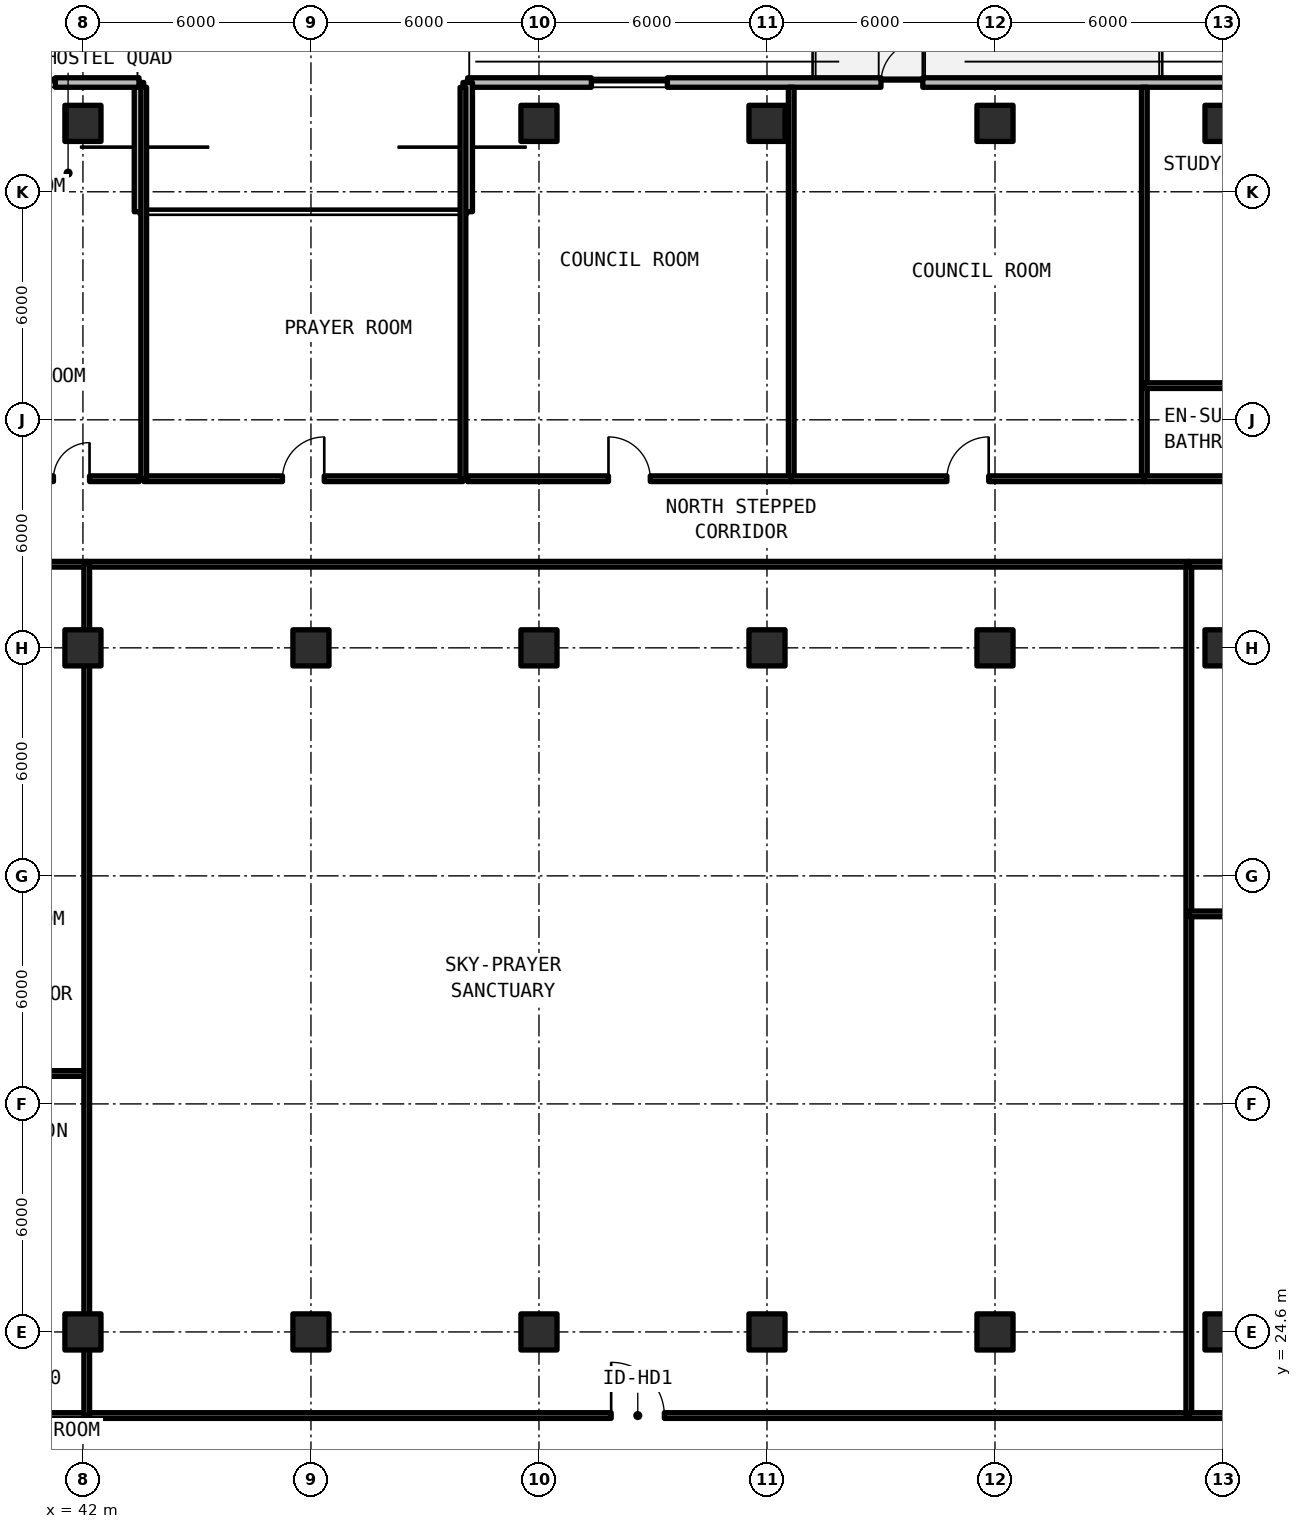
"""IFC4 building model, lengths in metres.
Left out: names, types, materials, properties, quantities, classifications, styles, units other than length and angle.
Written with IfcOpenShell. Run it as: python <this file> out.ifc"""

import sys

from ifc_helpers import new_model, si_unit, direction, frame, frame_2d, origin, origin_2d, place, context, subcontext, project, spatial, rectangle, extrude, element, fill, save


model = new_model("IFC4")
c1 = context("Model", 3, precision=1e-05, world=origin(), true_north=direction((0.0, 1.0)))
c2 = subcontext(c1, "Body", "Model", "MODEL_VIEW")
j1 = project(units=[si_unit("LENGTHUNIT", "METRE"), si_unit("PLANEANGLEUNIT", "RADIAN")], contexts=[c1])
p1 = place(None, origin())
s1 = spatial("IfcSite", under=j1, at=p1, CompositionType="ELEMENT")
p2 = place(p1, origin())
s2 = spatial("IfcBuilding", under=s1, at=p2, CompositionType="ELEMENT")
p3 = place(p2, frame((0.0, 0.0, 115.83)))
s3 = spatial("IfcBuildingStorey", under=s2, at=p3, CompositionType="ELEMENT", Elevation=115.83)
for number, where, z_axis, x_axis in (
    (1, (42.0, 24.6, 0.0), (0.0, 0.0, 1.0), (1.0, 0.0, 0.0)),
    (2, (42.0, 42.6, 0.0), (0.0, 0.0, 1.0), (1.0, 0.0, 0.0)),
    (3, (48.0, 24.6, 0.0), (0.0, 0.0, 1.0), (1.0, 0.0, 0.0)),
    (4, (48.0, 42.6, 0.0), (0.0, 0.0, 1.0), (1.0, 0.0, 0.0)),
    (5, (54.0, 24.6, 0.0), (0.0, 0.0, 1.0), (1.0, 0.0, 0.0)),
    (6, (54.0, 42.6, 0.0), (0.0, 0.0, 1.0), (1.0, 0.0, 0.0)),
    (7, (60.0, 24.6, 0.0), (0.0, 0.0, 1.0), (1.0, 0.0, 0.0)),
    (8, (60.0, 42.6, 0.0), (0.0, 0.0, 1.0), (1.0, 0.0, 0.0)),
    (9, (66.0, 24.6, 0.0), (0.0, 0.0, 1.0), (1.0, 0.0, 0.0)),
    (10, (66.0, 42.6, 0.0), (0.0, 0.0, 1.0), (1.0, 0.0, 0.0)),
    (11, (72.0, 24.6, 0.0), (0.0, 0.0, 1.0), (1.0, 0.0, 0.0)),
    (12, (72.0, 42.6, 0.0), (0.0, 0.0, 1.0), (1.0, 0.0, 0.0)),
    (13, (42.0, 56.4, 0.0), (0.0, 0.0, 1.0), (1.0, 0.0, 0.0)),
    (14, (54.0, 56.4, 0.0), (0.0, 0.0, 1.0), (1.0, 0.0, 0.0)),
    (15, (60.0, 56.4, 0.0), (0.0, 0.0, 1.0), (1.0, 0.0, 0.0)),
    (16, (66.0, 56.4, 0.0), (0.0, 0.0, 1.0), (1.0, 0.0, 0.0)),
    (17, (72.0, 56.4, 0.0), (0.0, 0.0, 1.0), (1.0, 0.0, 0.0)),
):
    element("IfcColumn", number, at=place(p3, frame(where, z_axis=z_axis, x_axis=x_axis)), inside=s3, PredefinedType="COLUMN", context=c2, shape_type="SweptSolid", body=[
        extrude(rectangle(XDim=0.95, YDim=0.95, at=origin_2d()), origin(), (0.0, 0.0, 1.0), 3.63),
    ])
p4 = place(p3, frame((96.148, 57.475, 0.0), z_axis=(0.0, 0.0, 1.0), x_axis=(-1.0, 0.0, 0.0)))
e18 = element("IfcWall", 18, at=p4, inside=s3, PredefinedType="SOLIDWALL", context=c2, shape_type="SweptSolid", body=[
    extrude(rectangle(XDim=44.023, YDim=0.25, at=frame_2d((22.012, 0.0))), origin(), (0.0, 0.0, 1.0), 3.41),
])
p5 = place(p4, frame((32.048, 0.0, 0.0)))
e19 = element("IfcOpeningElement", 19, at=p5, cuts=e18, PredefinedType="OPENING", context=c2, shape_type="SweptSolid", body=[
    extrude(rectangle(XDim=1.1, YDim=2.15, at=frame_2d((0.55, 1.075))), frame((0.0, 0.135, 0.0), z_axis=(0.0, -1.0, 0.0), x_axis=(1.0, 0.0, 0.0)), (0.0, 0.0, 1.0), 0.27),
])
p6 = place(p4, frame((19.948, 0.0, 0.0)))
e20 = element("IfcOpeningElement", 20, at=p6, cuts=e18, PredefinedType="OPENING", context=c2, shape_type="SweptSolid", body=[
    extrude(rectangle(XDim=1.1, YDim=2.15, at=frame_2d((0.55, 1.075))), frame((0.0, 0.135, 0.0), z_axis=(0.0, -1.0, 0.0), x_axis=(1.0, 0.0, 0.0)), (0.0, 0.0, 1.0), 0.27),
])
p7 = place(p4, frame((7.848, 0.0, 0.0)))
e21 = element("IfcOpeningElement", 21, at=p7, cuts=e18, PredefinedType="OPENING", context=c2, shape_type="SweptSolid", body=[
    extrude(rectangle(XDim=1.1, YDim=2.15, at=frame_2d((0.55, 1.075))), frame((0.0, 0.135, 0.0), z_axis=(0.0, -1.0, 0.0), x_axis=(1.0, 0.0, 0.0)), (0.0, 0.0, 1.0), 0.27),
])
p8 = place(p4, frame((38.769, 0.0, 0.78)))
e22 = element("IfcOpeningElement", 22, at=p8, cuts=e18, PredefinedType="OPENING", context=c2, shape_type="SweptSolid", body=[
    extrude(rectangle(XDim=2.0, YDim=1.66, at=frame_2d((1.0, 0.83))), frame((0.0, 0.135, 0.0), z_axis=(0.0, -1.0, 0.0), x_axis=(1.0, 0.0, 0.0)), (0.0, 0.0, 1.0), 0.27),
])
p9 = place(p4, frame((22.668, 0.0, 0.78)))
e23 = element("IfcOpeningElement", 23, at=p9, cuts=e18, PredefinedType="OPENING", context=c2, shape_type="SweptSolid", body=[
    extrude(rectangle(XDim=0.85, YDim=1.65, at=frame_2d((0.425, 0.825))), frame((0.0, 0.135, 0.0), z_axis=(0.0, -1.0, 0.0), x_axis=(1.0, 0.0, 0.0)), (0.0, 0.0, 1.0), 0.27),
])
p10 = place(p4, frame((14.119, 0.0, 0.78)))
e24 = element("IfcOpeningElement", 24, at=p10, cuts=e18, PredefinedType="OPENING", context=c2, shape_type="SweptSolid", body=[
    extrude(rectangle(XDim=2.0, YDim=1.66, at=frame_2d((1.0, 0.83))), frame((0.0, 0.135, 0.0), z_axis=(0.0, -1.0, 0.0), x_axis=(1.0, 0.0, 0.0)), (0.0, 0.0, 1.0), 0.27),
])
p11 = place(p4, frame((1.884, 0.0, 0.78)))
e25 = element("IfcOpeningElement", 25, at=p11, cuts=e18, PredefinedType="OPENING", context=c2, shape_type="SweptSolid", body=[
    extrude(rectangle(XDim=2.0, YDim=1.66, at=frame_2d((1.0, 0.83))), frame((0.0, 0.135, 0.0), z_axis=(0.0, -1.0, 0.0), x_axis=(1.0, 0.0, 0.0)), (0.0, 0.0, 1.0), 0.27),
])
for number, where, z_axis, x_axis in (
    (26, (52.125, 57.475, 0.0), (0.0, 0.0, 1.0), (0.0, -1.0, 0.0)),
    (27, (43.475, 54.075, 0.0), (0.0, 0.0, 1.0), (0.0, 1.0, 0.0)),
):
    element("IfcWall", number, at=place(p3, frame(where, z_axis=z_axis, x_axis=x_axis)), inside=s3, PredefinedType="SOLIDWALL", context=c2, shape_type="SweptSolid", body=[
        extrude(rectangle(XDim=3.4, YDim=0.25, at=frame_2d((1.7, 0.0))), origin(), (0.0, 0.0, 1.0), 3.41),
    ])
p12 = place(p3, frame((43.475, 57.475, 0.0), z_axis=(0.0, 0.0, 1.0), x_axis=(-1.0, 0.0, 0.0)))
e28 = element("IfcWall", 28, at=p12, inside=s3, PredefinedType="SOLIDWALL", context=c2, shape_type="SweptSolid", body=[
    extrude(rectangle(XDim=22.023, YDim=0.25, at=frame_2d((11.012, 0.0))), origin(), (0.0, 0.0, 1.0), 3.41),
])
p13 = place(p12, frame((9.175, 0.0, 0.0)))
e29 = element("IfcOpeningElement", 29, at=p13, cuts=e28, PredefinedType="OPENING", context=c2, shape_type="SweptSolid", body=[
    extrude(rectangle(XDim=1.1, YDim=2.15, at=frame_2d((0.55, 1.075))), frame((0.0, 0.135, 0.0), z_axis=(0.0, -1.0, 0.0), x_axis=(1.0, 0.0, 0.0)), (0.0, 0.0, 1.0), 0.27),
])
p14 = place(p12, frame((16.635, 0.0, 0.78)))
e30 = element("IfcOpeningElement", 30, at=p14, cuts=e28, PredefinedType="OPENING", context=c2, shape_type="SweptSolid", body=[
    extrude(rectangle(XDim=2.0, YDim=1.66, at=frame_2d((1.0, 0.83))), frame((0.0, 0.135, 0.0), z_axis=(0.0, -1.0, 0.0), x_axis=(1.0, 0.0, 0.0)), (0.0, 0.0, 1.0), 0.27),
])
p15 = place(p12, frame((14.173, 0.0, 0.78)))
e31 = element("IfcOpeningElement", 31, at=p15, cuts=e28, PredefinedType="OPENING", context=c2, shape_type="SweptSolid", body=[
    extrude(rectangle(XDim=0.85, YDim=1.65, at=frame_2d((0.425, 0.825))), frame((0.0, 0.135, 0.0), z_axis=(0.0, -1.0, 0.0), x_axis=(1.0, 0.0, 0.0)), (0.0, 0.0, 1.0), 0.27),
])
p16 = place(p12, frame((11.592, 0.0, 0.78)))
e32 = element("IfcOpeningElement", 32, at=p16, cuts=e28, PredefinedType="OPENING", context=c2, shape_type="SweptSolid", body=[
    extrude(rectangle(XDim=0.85, YDim=1.65, at=frame_2d((0.425, 0.825))), frame((0.0, 0.135, 0.0), z_axis=(0.0, -1.0, 0.0), x_axis=(1.0, 0.0, 0.0)), (0.0, 0.0, 1.0), 0.27),
])
p17 = place(p12, frame((4.141, 0.0, 0.78)))
e33 = element("IfcOpeningElement", 33, at=p17, cuts=e28, PredefinedType="OPENING", context=c2, shape_type="SweptSolid", body=[
    extrude(rectangle(XDim=0.85, YDim=1.65, at=frame_2d((0.425, 0.825))), frame((0.0, 0.135, 0.0), z_axis=(0.0, -1.0, 0.0), x_axis=(1.0, 0.0, 0.0)), (0.0, 0.0, 1.0), 0.27),
])
p18 = place(p12, frame((2.201, 0.0, 0.78)))
e34 = element("IfcOpeningElement", 34, at=p18, cuts=e28, PredefinedType="OPENING", context=c2, shape_type="SweptSolid", body=[
    extrude(rectangle(XDim=0.85, YDim=1.65, at=frame_2d((0.425, 0.825))), frame((0.0, 0.135, 0.0), z_axis=(0.0, -1.0, 0.0), x_axis=(1.0, 0.0, 0.0)), (0.0, 0.0, 1.0), 0.27),
])
for number, where, z_axis, x_axis in (
    (35, (38.6, 22.4, 0.0), (0.0, 0.0, 1.0), (1.0, 0.0, 0.0)),
    (36, (38.6, 31.4, 0.0), (0.0, 0.0, 1.0), (1.0, 0.0, 0.0)),
    (37, (38.6, 44.8, 0.0), (0.0, 0.0, 1.0), (1.0, 0.0, 0.0)),
):
    element("IfcWall", number, at=place(p3, frame(where, z_axis=z_axis, x_axis=x_axis)), inside=s3, PredefinedType="SOLIDWALL", context=c2, shape_type="SweptSolid", body=[
        extrude(rectangle(XDim=3.5, YDim=0.15, at=frame_2d((1.75, 0.0))), origin(), (0.0, 0.0, 1.0), 2.63),
    ])
p19 = place(p3, frame((42.1, 22.4, 0.0), z_axis=(0.0, 0.0, 1.0), x_axis=(1.0, 0.0, 0.0)))
e38 = element("IfcWall", 38, at=p19, inside=s3, PredefinedType="SOLIDWALL", context=c2, shape_type="SweptSolid", body=[
    extrude(rectangle(XDim=29.0, YDim=0.15, at=frame_2d((14.5, 0.0))), origin(), (0.0, 0.0, 1.0), 2.63),
])
p20 = place(p19, frame((13.8, 0.0, 0.0)))
e39 = element("IfcOpeningElement", 39, at=p20, cuts=e38, PredefinedType="OPENING", context=c2, shape_type="SweptSolid", body=[
    extrude(rectangle(XDim=1.4, YDim=2.15, at=frame_2d((0.7, 1.075))), frame((0.0, 0.085, 0.0), z_axis=(0.0, -1.0, 0.0), x_axis=(1.0, 0.0, 0.0)), (0.0, 0.0, 1.0), 0.17),
])
p21 = place(p3, frame((42.1, 44.8, 0.0), z_axis=(0.0, 0.0, 1.0), x_axis=(1.0, 0.0, 0.0)))
e40 = element("IfcWall", 40, at=p21, inside=s3, PredefinedType="SOLIDWALL", context=c2, shape_type="SweptSolid", body=[
    extrude(rectangle(XDim=29.0, YDim=0.15, at=frame_2d((14.5, 0.0))), origin(), (0.0, 0.0, 1.0), 2.63),
])
for number, where, z_axis, x_axis in (
    (41, (42.1, 22.4, 0.0), (0.0, 0.0, 1.0), (0.0, 1.0, 0.0)),
    (42, (71.1, 22.4, 0.0), (0.0, 0.0, 1.0), (0.0, 1.0, 0.0)),
):
    element("IfcWall", number, at=place(p3, frame(where, z_axis=z_axis, x_axis=x_axis)), inside=s3, PredefinedType="SOLIDWALL", context=c2, shape_type="SweptSolid", body=[
        extrude(rectangle(XDim=22.4, YDim=0.15, at=frame_2d((11.2, 0.0))), origin(), (0.0, 0.0, 1.0), 2.63),
    ])
for number, where, z_axis, x_axis in (
    (43, (71.1, 22.4, 0.0), (0.0, 0.0, 1.0), (1.0, 0.0, 0.0)),
    (44, (71.1, 35.6, 0.0), (0.0, 0.0, 1.0), (1.0, 0.0, 0.0)),
    (45, (71.1, 44.8, 0.0), (0.0, 0.0, 1.0), (1.0, 0.0, 0.0)),
):
    element("IfcWall", number, at=place(p3, frame(where, z_axis=z_axis, x_axis=x_axis)), inside=s3, PredefinedType="SOLIDWALL", context=c2, shape_type="SweptSolid", body=[
        extrude(rectangle(XDim=4.3, YDim=0.15, at=frame_2d((2.15, 0.0))), origin(), (0.0, 0.0, 1.0), 2.63),
    ])
p22 = place(p3, frame((43.6, 47.05, 0.0), z_axis=(0.0, 0.0, 1.0), x_axis=(1.0, 0.0, 0.0)))
e46 = element("IfcWall", 46, at=p22, inside=s3, PredefinedType="SOLIDWALL", context=c2, shape_type="SweptSolid", body=[
    extrude(rectangle(XDim=8.4, YDim=0.15, at=frame_2d((4.2, 0.0))), origin(), (0.0, 0.0, 1.0), 2.63),
])
p23 = place(p22, frame((3.65, 0.0, 0.0)))
e47 = element("IfcOpeningElement", 47, at=p23, cuts=e46, PredefinedType="OPENING", context=c2, shape_type="SweptSolid", body=[
    extrude(rectangle(XDim=1.1, YDim=2.15, at=frame_2d((0.55, 1.075))), frame((0.0, 0.085, 0.0), z_axis=(0.0, -1.0, 0.0), x_axis=(1.0, 0.0, 0.0)), (0.0, 0.0, 1.0), 0.17),
])
for number, where, z_axis, x_axis in (
    (48, (43.6, 47.05, 0.0), (0.0, 0.0, 1.0), (0.0, 1.0, 0.0)),
    (49, (52.0, 47.05, 0.0), (0.0, 0.0, 1.0), (0.0, 1.0, 0.0)),
):
    element("IfcWall", number, at=place(p3, frame(where, z_axis=z_axis, x_axis=x_axis)), inside=s3, PredefinedType="SOLIDWALL", context=c2, shape_type="SweptSolid", body=[
        extrude(rectangle(XDim=10.3, YDim=0.15, at=frame_2d((5.15, 0.0))), origin(), (0.0, 0.0, 1.0), 2.63),
    ])
p24 = place(p3, frame((37.961, 47.05, 0.0), z_axis=(0.0, 0.0, 1.0), x_axis=(1.0, 0.0, 0.0)))
e50 = element("IfcWall", 50, at=p24, inside=s3, PredefinedType="SOLIDWALL", context=c2, shape_type="SweptSolid", body=[
    extrude(rectangle(XDim=5.519, YDim=0.15, at=frame_2d((2.76, 0.0))), origin(), (0.0, 0.0, 1.0), 2.63),
])
p25 = place(p24, frame((3.263, 0.0, 0.0)))
e51 = element("IfcOpeningElement", 51, at=p25, cuts=e50, PredefinedType="OPENING", context=c2, shape_type="SweptSolid", body=[
    extrude(rectangle(XDim=0.95, YDim=2.15, at=frame_2d((0.475, 1.075))), frame((0.0, 0.085, 0.0), z_axis=(0.0, -1.0, 0.0), x_axis=(1.0, 0.0, 0.0)), (0.0, 0.0, 1.0), 0.17),
])
p26 = place(p3, frame((60.638, 47.05, 0.0), z_axis=(0.0, 0.0, 1.0), x_axis=(0.0, 1.0, 0.0)))
e52 = element("IfcWall", 52, at=p26, inside=s3, PredefinedType="SOLIDWALL", context=c2, shape_type="SweptSolid", body=[
    extrude(rectangle(XDim=10.3, YDim=0.15, at=frame_2d((5.15, 0.0))), origin(), (0.0, 0.0, 1.0), 2.63),
])
p27 = place(p3, frame((52.12, 47.05, 0.0), z_axis=(0.0, 0.0, 1.0), x_axis=(1.0, 0.0, 0.0)))
e53 = element("IfcWall", 53, at=p27, inside=s3, PredefinedType="SOLIDWALL", context=c2, shape_type="SweptSolid", body=[
    extrude(rectangle(XDim=8.518, YDim=0.15, at=frame_2d((4.259, 0.0))), origin(), (0.0, 0.0, 1.0), 2.63),
])
p28 = place(p27, frame((3.709, 0.0, 0.0)))
e54 = element("IfcOpeningElement", 54, at=p28, cuts=e53, PredefinedType="OPENING", context=c2, shape_type="SweptSolid", body=[
    extrude(rectangle(XDim=1.1, YDim=2.15, at=frame_2d((0.55, 1.075))), frame((0.0, 0.085, 0.0), z_axis=(0.0, -1.0, 0.0), x_axis=(1.0, 0.0, 0.0)), (0.0, 0.0, 1.0), 0.17),
])
p29 = place(p3, frame((69.93, 47.05, 0.0), z_axis=(0.0, 0.0, 1.0), x_axis=(0.0, 1.0, 0.0)))
e55 = element("IfcWall", 55, at=p29, inside=s3, PredefinedType="SOLIDWALL", context=c2, shape_type="SweptSolid", body=[
    extrude(rectangle(XDim=10.3, YDim=0.15, at=frame_2d((5.15, 0.0))), origin(), (0.0, 0.0, 1.0), 2.63),
])
p30 = place(p3, frame((60.638, 47.05, 0.0), z_axis=(0.0, 0.0, 1.0), x_axis=(1.0, 0.0, 0.0)))
e56 = element("IfcWall", 56, at=p30, inside=s3, PredefinedType="SOLIDWALL", context=c2, shape_type="SweptSolid", body=[
    extrude(rectangle(XDim=9.292, YDim=0.15, at=frame_2d((4.646, 0.0))), origin(), (0.0, 0.0, 1.0), 2.63),
])
p31 = place(p30, frame((4.096, 0.0, 0.0)))
e57 = element("IfcOpeningElement", 57, at=p31, cuts=e56, PredefinedType="OPENING", context=c2, shape_type="SweptSolid", body=[
    extrude(rectangle(XDim=1.1, YDim=2.15, at=frame_2d((0.55, 1.075))), frame((0.0, 0.085, 0.0), z_axis=(0.0, -1.0, 0.0), x_axis=(1.0, 0.0, 0.0)), (0.0, 0.0, 1.0), 0.17),
])
p32 = place(p3, frame((69.93, 49.5, 0.0), z_axis=(0.0, 0.0, 1.0), x_axis=(1.0, 0.0, 0.0)))
e58 = element("IfcWall", 58, at=p32, inside=s3, PredefinedType="PARTITIONING", context=c2, shape_type="SweptSolid", body=[
    extrude(rectangle(XDim=3.99, YDim=0.15, at=frame_2d((1.995, 0.0))), origin(), (0.0, 0.0, 1.0), 2.63),
])
p33 = place(p3, frame((69.93, 47.05, 0.0), z_axis=(0.0, 0.0, 1.0), x_axis=(1.0, 0.0, 0.0)))
e59 = element("IfcWall", 59, at=p33, inside=s3, PredefinedType="SOLIDWALL", context=c2, shape_type="SweptSolid", body=[
    extrude(rectangle(XDim=7.485, YDim=0.15, at=frame_2d((3.743, 0.0))), origin(), (0.0, 0.0, 1.0), 2.63),
])
p34 = place(p33, frame((5.302, 0.0, 0.0)))
e60 = element("IfcOpeningElement", 60, at=p34, cuts=e59, PredefinedType="OPENING", context=c2, shape_type="SweptSolid", body=[
    extrude(rectangle(XDim=0.95, YDim=2.15, at=frame_2d((0.475, 1.075))), frame((0.0, 0.085, 0.0), z_axis=(0.0, -1.0, 0.0), x_axis=(1.0, 0.0, 0.0)), (0.0, 0.0, 1.0), 0.17),
])
p35 = place(p5, frame((1.1, 0.0, 0.0), z_axis=(0.0, 0.0, 1.0), x_axis=(-1.0, 0.0, 0.0)))
e61 = element("IfcDoor", 61, at=p35, inside=s3, OperationType="SINGLE_SWING_LEFT", PredefinedType="DOOR", context=c2, shape_type="SweptSolid", body=[
    extrude(rectangle(XDim=1.1, YDim=2.15, at=frame_2d((0.55, 1.075))), frame((0.0, 0.025, 0.0), z_axis=(0.0, -1.0, 0.0), x_axis=(1.0, 0.0, 0.0)), (0.0, 0.0, 1.0), 0.05),
])
fill(e19, e61)
p36 = place(p8, origin())
e62 = element("IfcWindow", 62, at=p36, inside=s3, PartitioningType="SINGLE_PANEL", PredefinedType="WINDOW", context=c2, shape_type="SweptSolid", body=[
    extrude(rectangle(XDim=2.0, YDim=1.66, at=frame_2d((1.0, 0.83))), frame((0.0, 0.03, 0.0), z_axis=(0.0, -1.0, 0.0), x_axis=(1.0, 0.0, 0.0)), (0.0, 0.0, 1.0), 0.06),
])
fill(e22, e62)
p37 = place(p18, origin())
e63 = element("IfcWindow", 63, at=p37, inside=s3, PartitioningType="SINGLE_PANEL", PredefinedType="WINDOW", context=c2, shape_type="SweptSolid", body=[
    extrude(rectangle(XDim=0.85, YDim=1.65, at=frame_2d((0.425, 0.825))), frame((0.0, 0.03, 0.0), z_axis=(0.0, -1.0, 0.0), x_axis=(1.0, 0.0, 0.0)), (0.0, 0.0, 1.0), 0.06),
])
fill(e34, e63)
p38 = place(p20, origin())
e64 = element("IfcDoor", 64, at=p38, inside=s3, OperationType="SINGLE_SWING_RIGHT", PredefinedType="DOOR", context=c2, shape_type="SweptSolid", body=[
    extrude(rectangle(XDim=1.4, YDim=2.15, at=frame_2d((0.7, 1.075))), frame((0.0, 0.025, 0.0), z_axis=(0.0, -1.0, 0.0), x_axis=(1.0, 0.0, 0.0)), (0.0, 0.0, 1.0), 0.05),
])
fill(e39, e64)
p39 = place(p23, origin())
e65 = element("IfcDoor", 65, at=p39, inside=s3, OperationType="SINGLE_SWING_RIGHT", PredefinedType="DOOR", context=c2, shape_type="SweptSolid", body=[
    extrude(rectangle(XDim=1.1, YDim=2.15, at=frame_2d((0.55, 1.075))), frame((0.0, 0.025, 0.0), z_axis=(0.0, -1.0, 0.0), x_axis=(1.0, 0.0, 0.0)), (0.0, 0.0, 1.0), 0.05),
])
fill(e47, e65)
p40 = place(p25, origin())
e66 = element("IfcDoor", 66, at=p40, inside=s3, OperationType="SINGLE_SWING_RIGHT", PredefinedType="DOOR", context=c2, shape_type="SweptSolid", body=[
    extrude(rectangle(XDim=0.95, YDim=2.15, at=frame_2d((0.475, 1.075))), frame((0.0, 0.025, 0.0), z_axis=(0.0, -1.0, 0.0), x_axis=(1.0, 0.0, 0.0)), (0.0, 0.0, 1.0), 0.05),
])
fill(e51, e66)
p41 = place(p28, origin())
e67 = element("IfcDoor", 67, at=p41, inside=s3, OperationType="SINGLE_SWING_LEFT", PredefinedType="DOOR", context=c2, shape_type="SweptSolid", body=[
    extrude(rectangle(XDim=1.1, YDim=2.15, at=frame_2d((0.55, 1.075))), frame((0.0, 0.025, 0.0), z_axis=(0.0, -1.0, 0.0), x_axis=(1.0, 0.0, 0.0)), (0.0, 0.0, 1.0), 0.05),
])
fill(e54, e67)
p42 = place(p31, origin())
e68 = element("IfcDoor", 68, at=p42, inside=s3, OperationType="SINGLE_SWING_RIGHT", PredefinedType="DOOR", context=c2, shape_type="SweptSolid", body=[
    extrude(rectangle(XDim=1.1, YDim=2.15, at=frame_2d((0.55, 1.075))), frame((0.0, 0.025, 0.0), z_axis=(0.0, -1.0, 0.0), x_axis=(1.0, 0.0, 0.0)), (0.0, 0.0, 1.0), 0.05),
])
fill(e57, e68)
save(model, sys.argv[1])
